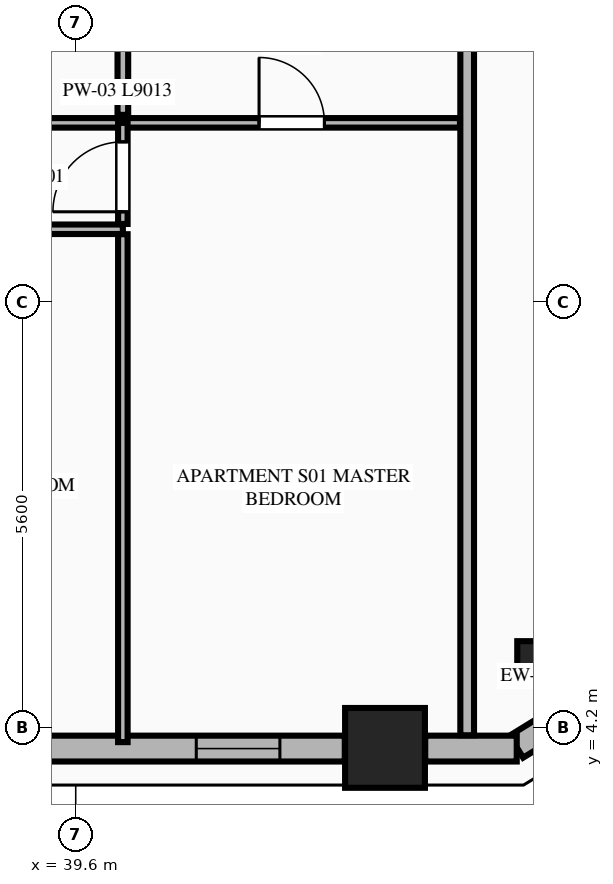
"""IFC4 building model, lengths in metres.
Left out: names, types, materials, properties, quantities, classifications, styles, units other than length and angle.
Written with IfcOpenShell. Run it as: python <this file> out.ifc"""

import sys

from ifc_helpers import new_model, si_unit, direction, frame, frame_2d, origin, origin_2d, place, context, subcontext, project, spatial, rectangle, extrude, element, fill, save


model = new_model("IFC4")
c1 = context("Model", 3, precision=1e-05, world=origin(), true_north=direction((0.0, 1.0)))
c2 = subcontext(c1, "Body", "Model", "MODEL_VIEW")
j1 = project(units=[si_unit("LENGTHUNIT", "METRE"), si_unit("PLANEANGLEUNIT", "RADIAN")], contexts=[c1])
p1 = place(None, origin())
s1 = spatial("IfcSite", under=j1, at=p1, CompositionType="ELEMENT")
p2 = place(p1, origin())
s2 = spatial("IfcBuilding", under=s1, at=p2, CompositionType="ELEMENT")
p3 = place(p2, frame((0.0, 0.0, 144.55)))
s3 = spatial("IfcBuildingStorey", under=s2, at=p3, CompositionType="ELEMENT", Elevation=144.55)
p4 = place(p3, frame((43.669, 3.939, 0.0), z_axis=(0.0, 0.0, 1.0), x_axis=(1.0, 0.0, 0.0)))
e1 = element("IfcColumn", 1, at=p4, inside=s3, PredefinedType="COLUMN", context=c2, shape_type="SweptSolid", body=[
    extrude(rectangle(XDim=1.05, YDim=1.05, at=origin_2d()), origin(), (0.0, 0.0, 1.0), 3.55),
])
p5 = place(p3, frame((45.659, 5.093, 0.0), z_axis=(0.0, 0.0, 1.0), x_axis=(0.865160173452, 0.501495637342, 0.0)))
e2 = element("IfcColumn", 2, at=p5, inside=s3, PredefinedType="PILASTER", context=c2, shape_type="SweptSolid", body=[
    extrude(rectangle(XDim=0.5, YDim=0.35, at=origin_2d()), origin(), (0.0, 0.0, 1.0), 3.55),
])
p6 = place(p3, frame((45.397, 3.955, 0.0), z_axis=(0.0, 0.0, 1.0), x_axis=(0.851798915137, 0.523868884523, 0.0)))
e3 = element("IfcWall", 3, at=p6, inside=s3, PredefinedType="STANDARD", context=c2, shape_type="SweptSolid", body=[
    extrude(rectangle(XDim=1.848, YDim=0.34, at=frame_2d((0.924, 0.0))), origin(), (0.0, 0.0, 1.0), 3.27),
])
p7 = place(p3, frame((36.761, 3.93, 0.0), z_axis=(0.0, 0.0, 1.0), x_axis=(1.0, 0.0, 0.0)))
e4 = element("IfcWall", 4, at=p7, inside=s3, PredefinedType="STANDARD", context=c2, shape_type="SweptSolid", body=[
    extrude(rectangle(XDim=6.379, YDim=0.34, at=frame_2d((3.189, 0.0))), origin(), (0.0, 0.0, 1.0), 2.727),
])
p8 = place(p7, frame((1.123, 0.0, 0.75)))
e5 = element("IfcOpeningElement", 5, at=p8, cuts=e4, PredefinedType="OPENING", context=c2, shape_type="SweptSolid", body=[
    extrude(rectangle(XDim=1.1, YDim=1.827, at=frame_2d((0.55, 0.914))), frame((0.0, 0.18, 0.0), z_axis=(0.0, -1.0, 0.0), x_axis=(1.0, 0.0, 0.0)), (0.0, 0.0, 1.0), 0.36),
])
p9 = place(p7, frame((4.425, 0.0, 0.75)))
e6 = element("IfcOpeningElement", 6, at=p9, cuts=e4, PredefinedType="OPENING", context=c2, shape_type="SweptSolid", body=[
    extrude(rectangle(XDim=1.1, YDim=1.827, at=frame_2d((0.55, 0.914))), frame((0.0, 0.18, 0.0), z_axis=(0.0, -1.0, 0.0), x_axis=(1.0, 0.0, 0.0)), (0.0, 0.0, 1.0), 0.36),
])
p10 = place(p3, frame((44.198, 3.93, 0.0), z_axis=(0.0, 0.0, 1.0), x_axis=(1.0, 0.0, 0.0)))
e7 = element("IfcWall", 7, at=p10, inside=s3, PredefinedType="STANDARD", context=c2, shape_type="SweptSolid", body=[
    extrude(rectangle(XDim=1.204, YDim=0.34, at=frame_2d((0.602, 0.0))), origin(), (0.0, 0.0, 1.0), 3.27),
])
p11 = place(p3, frame((44.75, 4.105, 0.0), z_axis=(0.0, 0.0, 1.0), x_axis=(0.0, 1.0, 0.0)))
e8 = element("IfcWall", 8, at=p11, inside=s3, PredefinedType="PARTITIONING", context=c2, shape_type="SweptSolid", body=[
    extrude(rectangle(XDim=12.395, YDim=0.18, at=frame_2d((6.198, 0.0))), origin(), (0.0, 0.0, 1.0), 3.27),
])
p12 = place(p3, frame((35.642, 12.162, 0.0), z_axis=(0.0, 0.0, 1.0), x_axis=(1.0, 0.0, 0.0)))
e9 = element("IfcWall", 9, at=p12, inside=s3, PredefinedType="PARTITIONING", context=c2, shape_type="SweptSolid", body=[
    extrude(rectangle(XDim=9.013, YDim=0.125, at=frame_2d((4.506, 0.0))), origin(), (0.0, 0.0, 1.0), 3.27),
])
p13 = place(p12, frame((6.37, 0.0, 0.0)))
e10 = element("IfcOpeningElement", 10, at=p13, cuts=e9, PredefinedType="OPENING", context=c2, shape_type="SweptSolid", body=[
    extrude(rectangle(XDim=0.86, YDim=2.1, at=frame_2d((0.43, 1.05))), frame((0.0, 0.073, 0.0), z_axis=(0.0, -1.0, 0.0), x_axis=(1.0, 0.0, 0.0)), (0.0, 0.0, 1.0), 0.145),
])
p14 = place(p12, frame((0.3, 0.0, 0.0)))
e11 = element("IfcOpeningElement", 11, at=p14, cuts=e9, PredefinedType="OPENING", context=c2, shape_type="SweptSolid", body=[
    extrude(rectangle(XDim=0.88, YDim=2.15, at=frame_2d((0.44, 1.075))), frame((0.0, 0.073, 0.0), z_axis=(0.0, -1.0, 0.0), x_axis=(1.0, 0.0, 0.0)), (0.0, 0.0, 1.0), 0.145),
])
p15 = place(p3, frame((30.95, 10.762, 0.0), z_axis=(0.0, 0.0, 1.0), x_axis=(1.0, 0.0, 0.0)))
e12 = element("IfcWall", 12, at=p15, inside=s3, PredefinedType="PARTITIONING", context=c2, shape_type="SweptSolid", body=[
    extrude(rectangle(XDim=9.27, YDim=0.125, at=frame_2d((4.635, 0.0))), origin(), (0.0, 0.0, 1.0), 3.27),
])
p16 = place(p15, frame((0.35, 0.0, 0.0)))
e13 = element("IfcOpeningElement", 13, at=p16, cuts=e12, PredefinedType="OPENING", context=c2, shape_type="SweptSolid", body=[
    extrude(rectangle(XDim=0.92, YDim=2.15, at=frame_2d((0.46, 1.075))), frame((0.0, 0.073, 0.0), z_axis=(0.0, -1.0, 0.0), x_axis=(1.0, 0.0, 0.0)), (0.0, 0.0, 1.0), 0.145),
])
p17 = place(p15, frame((5.042, 0.0, 0.0)))
e14 = element("IfcOpeningElement", 14, at=p17, cuts=e12, PredefinedType="OPENING", context=c2, shape_type="SweptSolid", body=[
    extrude(rectangle(XDim=0.92, YDim=2.15, at=frame_2d((0.46, 1.075))), frame((0.0, 0.073, 0.0), z_axis=(0.0, -1.0, 0.0), x_axis=(1.0, 0.0, 0.0)), (0.0, 0.0, 1.0), 0.145),
])
p18 = place(p3, frame((40.22, 10.832, 0.0), z_axis=(0.0, 0.0, 1.0), x_axis=(0.0, 1.0, 0.0)))
e15 = element("IfcWall", 15, at=p18, inside=s3, PredefinedType="PARTITIONING", context=c2, shape_type="SweptSolid", body=[
    extrude(rectangle(XDim=1.33, YDim=0.125, at=frame_2d((0.665, 0.0))), origin(), (0.0, 0.0, 1.0), 3.27),
])
p19 = place(p18, frame((0.16, 0.0, 0.0)))
e16 = element("IfcOpeningElement", 16, at=p19, cuts=e15, PredefinedType="OPENING", context=c2, shape_type="SweptSolid", body=[
    extrude(rectangle(XDim=0.92, YDim=2.15, at=frame_2d((0.46, 1.075))), frame((0.0, 0.073, 0.0), z_axis=(0.0, -1.0, 0.0), x_axis=(1.0, 0.0, 0.0)), (0.0, 0.0, 1.0), 0.145),
])
p20 = place(p3, frame((40.22, 4.015, 0.0), z_axis=(0.0, 0.0, 1.0), x_axis=(0.0, 1.0, 0.0)))
e17 = element("IfcWall", 17, at=p20, inside=s3, PredefinedType="PARTITIONING", context=c2, shape_type="SweptSolid", body=[
    extrude(rectangle(XDim=6.682, YDim=0.125, at=frame_2d((3.341, 0.0))), origin(), (0.0, 0.0, 1.0), 3.27),
])
p21 = place(p3, frame((40.22, 12.267, 0.0), z_axis=(0.0, 0.0, 1.0), x_axis=(0.0, 1.0, 0.0)))
e18 = element("IfcWall", 18, at=p21, inside=s3, PredefinedType="PLUMBINGWALL", context=c2, shape_type="SweptSolid", body=[
    extrude(rectangle(XDim=4.148, YDim=0.14, at=frame_2d((2.074, 0.0))), origin(), (0.0, 0.0, 1.0), 3.27),
])
p22 = place(p13, origin())
e19 = element("IfcDoor", 19, at=p22, inside=s3, OperationType="SINGLE_SWING_LEFT", PredefinedType="DOOR", context=c2, shape_type="SweptSolid", body=[
    extrude(rectangle(XDim=0.86, YDim=2.1, at=frame_2d((0.43, 1.05))), frame((0.0, 0.025, 0.0), z_axis=(0.0, -1.0, 0.0), x_axis=(1.0, 0.0, 0.0)), (0.0, 0.0, 1.0), 0.05),
])
fill(e10, e19)
p23 = place(p19, origin())
e20 = element("IfcDoor", 20, at=p23, inside=s3, OperationType="SINGLE_SWING_LEFT", PredefinedType="DOOR", context=c2, shape_type="SweptSolid", body=[
    extrude(rectangle(XDim=0.92, YDim=2.15, at=frame_2d((0.46, 1.075))), frame((0.0, 0.025, 0.0), z_axis=(0.0, -1.0, 0.0), x_axis=(1.0, 0.0, 0.0)), (0.0, 0.0, 1.0), 0.05),
])
fill(e16, e20)
p24 = place(p9, origin())
e21 = element("IfcWindow", 21, at=p24, inside=s3, PartitioningType="SINGLE_PANEL", PredefinedType="WINDOW", context=c2, shape_type="SweptSolid", body=[
    extrude(rectangle(XDim=1.1, YDim=1.827, at=frame_2d((0.55, 0.914))), frame((0.0, 0.03, 0.0), z_axis=(0.0, -1.0, 0.0), x_axis=(1.0, 0.0, 0.0)), (0.0, 0.0, 1.0), 0.06),
])
fill(e6, e21)
save(model, sys.argv[1])
